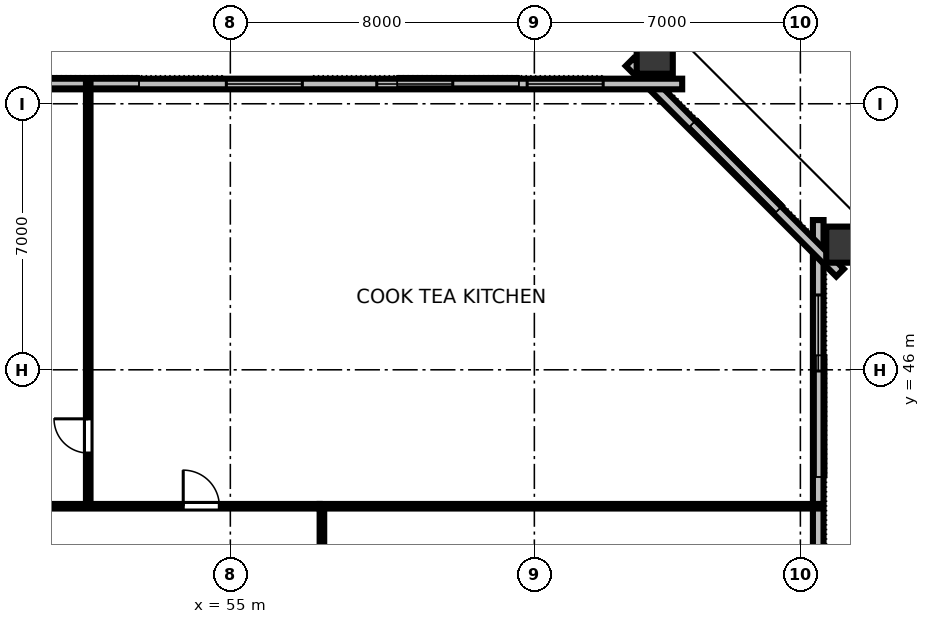
"""IFC4 building model, lengths in metres.
Left out: names, types, materials, properties, quantities, classifications, styles, units other than length and angle.
Written with IfcOpenShell. Run it as: python <this file> out.ifc"""

import sys

from ifc_helpers import new_model, si_unit, direction, frame, frame_2d, origin, origin_2d, place, context, subcontext, project, spatial, rectangle, hollow_rectangle, extrude, element, fill, save


model = new_model("IFC4")
c1 = context("Model", 3, precision=1e-05, world=origin(), true_north=direction((0.0, 1.0)))
c2 = subcontext(c1, "Body", "Model", "MODEL_VIEW")
j1 = project(units=[si_unit("LENGTHUNIT", "METRE"), si_unit("PLANEANGLEUNIT", "RADIAN")], contexts=[c1])
p1 = place(None, origin())
s1 = spatial("IfcSite", under=j1, at=p1, CompositionType="ELEMENT")
p2 = place(p1, origin())
s2 = spatial("IfcBuilding", under=s1, at=p2, CompositionType="ELEMENT")
p3 = place(p2, frame((0.0, 0.0, 67.6)))
s3 = spatial("IfcBuildingStorey", under=s2, at=p3, CompositionType="ELEMENT", Elevation=67.6)
p4 = place(p3, frame((71.256, 49.293, 0.0), z_axis=(0.103221863164, 0.030287087301, 0.994197133021), x_axis=(-0.953979075254, -0.279914028383, 0.107573512968)))
e1 = element("IfcColumn", 1, at=p4, inside=s3, PredefinedType="COLUMN", context=c2, shape_type="SweptSolid", body=[
    extrude(hollow_rectangle(XDim=0.95, YDim=1.15, WallThickness=0.06, at=origin_2d()), origin(), (0.0, 0.0, 1.0), 3.377),
])
p5 = place(p3, frame((66.168, 54.365, 0.0), z_axis=(0.044927645815, 0.088480693771, 0.995064155455), x_axis=(-0.891639602851, 0.452745865389, 0.0)))
e2 = element("IfcColumn", 2, at=p5, inside=s3, PredefinedType="COLUMN", context=c2, shape_type="SweptSolid", body=[
    extrude(hollow_rectangle(XDim=0.95, YDim=1.15, WallThickness=0.06, at=origin_2d()), origin(), (0.0, 0.0, 1.0), 3.375),
])
p6 = place(p3, frame((70.47, 14.06, 0.0), z_axis=(0.0, 0.0, 1.0), x_axis=(0.0, 1.0, 0.0)))
e3 = element("IfcWall", 3, at=p6, inside=s3, PredefinedType="STANDARD", context=c2, shape_type="SweptSolid", body=[
    extrude(rectangle(XDim=35.88, YDim=0.28, at=frame_2d((17.94, 0.0))), origin(), (0.0, 0.0, 1.0), 3.36),
])
p7 = place(p6, frame((19.29, 0.0, 0.0)))
e4 = element("IfcOpeningElement", 4, at=p7, cuts=e3, PredefinedType="OPENING", context=c2, shape_type="SweptSolid", body=[
    extrude(rectangle(XDim=1.4, YDim=2.15, at=frame_2d((0.7, 1.075))), frame((0.0, 0.15, 0.0), z_axis=(0.0, -1.0, 0.0), x_axis=(1.0, 0.0, 0.0)), (0.0, 0.0, 1.0), 0.3),
])
p8 = place(p6, frame((1.971, 0.0, 0.8)))
e5 = element("IfcOpeningElement", 5, at=p8, cuts=e3, PredefinedType="OPENING", context=c2, shape_type="SweptSolid", body=[
    extrude(rectangle(XDim=2.0, YDim=1.95, at=frame_2d((1.0, 0.975))), frame((0.0, 0.15, 0.0), z_axis=(0.0, -1.0, 0.0), x_axis=(1.0, 0.0, 0.0)), (0.0, 0.0, 1.0), 0.3),
])
p9 = place(p6, frame((9.456, 0.0, 0.8)))
e6 = element("IfcOpeningElement", 6, at=p9, cuts=e3, PredefinedType="OPENING", context=c2, shape_type="SweptSolid", body=[
    extrude(rectangle(XDim=2.0, YDim=1.95, at=frame_2d((1.0, 0.975))), frame((0.0, 0.15, 0.0), z_axis=(0.0, -1.0, 0.0), x_axis=(1.0, 0.0, 0.0)), (0.0, 0.0, 1.0), 0.3),
])
p10 = place(p6, frame((24.424, 0.0, 0.8)))
e7 = element("IfcOpeningElement", 7, at=p10, cuts=e3, PredefinedType="OPENING", context=c2, shape_type="SweptSolid", body=[
    extrude(rectangle(XDim=2.0, YDim=1.95, at=frame_2d((1.0, 0.975))), frame((0.0, 0.15, 0.0), z_axis=(0.0, -1.0, 0.0), x_axis=(1.0, 0.0, 0.0)), (0.0, 0.0, 1.0), 0.3),
])
p11 = place(p6, frame((31.909, 0.0, 0.8)))
e8 = element("IfcOpeningElement", 8, at=p11, cuts=e3, PredefinedType="OPENING", context=c2, shape_type="SweptSolid", body=[
    extrude(rectangle(XDim=2.0, YDim=1.95, at=frame_2d((1.0, 0.975))), frame((0.0, 0.15, 0.0), z_axis=(0.0, -1.0, 0.0), x_axis=(1.0, 0.0, 0.0)), (0.0, 0.0, 1.0), 0.3),
])
p12 = place(p3, frame((71.044, 48.554, 0.0), z_axis=(0.0, 0.0, 1.0), x_axis=(-0.707106781187, 0.707106781187, 0.0)))
e9 = element("IfcWall", 9, at=p12, inside=s3, PredefinedType="STANDARD", context=c2, shape_type="SweptSolid", body=[
    extrude(rectangle(XDim=7.834, YDim=0.28, at=frame_2d((3.917, 0.0))), origin(), (0.0, 0.0, 1.0), 3.36),
])
p13 = place(p3, frame((66.89, 53.52, 0.0), z_axis=(0.0, 0.0, 1.0), x_axis=(-1.0, 0.0, 0.0)))
e10 = element("IfcWall", 10, at=p13, inside=s3, PredefinedType="STANDARD", context=c2, shape_type="SweptSolid", body=[
    extrude(rectangle(XDim=41.78, YDim=0.28, at=frame_2d((20.89, 0.0))), origin(), (0.0, 0.0, 1.0), 3.36),
])
p14 = place(p13, frame((2.079, 0.0, 0.8)))
e11 = element("IfcOpeningElement", 11, at=p14, cuts=e10, PredefinedType="OPENING", context=c2, shape_type="SweptSolid", body=[
    extrude(rectangle(XDim=2.0, YDim=1.95, at=frame_2d((1.0, 0.975))), frame((0.0, 0.15, 0.0), z_axis=(0.0, -1.0, 0.0), x_axis=(1.0, 0.0, 0.0)), (0.0, 0.0, 1.0), 0.3),
])
p15 = place(p13, frame((6.037, 0.0, 0.8)))
e12 = element("IfcOpeningElement", 12, at=p15, cuts=e10, PredefinedType="OPENING", context=c2, shape_type="SweptSolid", body=[
    extrude(rectangle(XDim=2.0, YDim=1.95, at=frame_2d((1.0, 0.975))), frame((0.0, 0.15, 0.0), z_axis=(0.0, -1.0, 0.0), x_axis=(1.0, 0.0, 0.0)), (0.0, 0.0, 1.0), 0.3),
])
p16 = place(p13, frame((9.995, 0.0, 0.8)))
e13 = element("IfcOpeningElement", 13, at=p16, cuts=e10, PredefinedType="OPENING", context=c2, shape_type="SweptSolid", body=[
    extrude(rectangle(XDim=2.0, YDim=1.95, at=frame_2d((1.0, 0.975))), frame((0.0, 0.15, 0.0), z_axis=(0.0, -1.0, 0.0), x_axis=(1.0, 0.0, 0.0)), (0.0, 0.0, 1.0), 0.3),
])
p17 = place(p13, frame((21.869, 0.0, 0.8)))
e14 = element("IfcOpeningElement", 14, at=p17, cuts=e10, PredefinedType="OPENING", context=c2, shape_type="SweptSolid", body=[
    extrude(rectangle(XDim=2.0, YDim=1.95, at=frame_2d((1.0, 0.975))), frame((0.0, 0.15, 0.0), z_axis=(0.0, -1.0, 0.0), x_axis=(1.0, 0.0, 0.0)), (0.0, 0.0, 1.0), 0.3),
])
p18 = place(p13, frame((29.785, 0.0, 0.8)))
e15 = element("IfcOpeningElement", 15, at=p18, cuts=e10, PredefinedType="OPENING", context=c2, shape_type="SweptSolid", body=[
    extrude(rectangle(XDim=2.0, YDim=1.95, at=frame_2d((1.0, 0.975))), frame((0.0, 0.15, 0.0), z_axis=(0.0, -1.0, 0.0), x_axis=(1.0, 0.0, 0.0)), (0.0, 0.0, 1.0), 0.3),
])
p19 = place(p13, frame((33.743, 0.0, 0.8)))
e16 = element("IfcOpeningElement", 16, at=p19, cuts=e10, PredefinedType="OPENING", context=c2, shape_type="SweptSolid", body=[
    extrude(rectangle(XDim=2.0, YDim=1.95, at=frame_2d((1.0, 0.975))), frame((0.0, 0.15, 0.0), z_axis=(0.0, -1.0, 0.0), x_axis=(1.0, 0.0, 0.0)), (0.0, 0.0, 1.0), 0.3),
])
p20 = place(p13, frame((37.701, 0.0, 0.8)))
e17 = element("IfcOpeningElement", 17, at=p20, cuts=e10, PredefinedType="OPENING", context=c2, shape_type="SweptSolid", body=[
    extrude(rectangle(XDim=2.0, YDim=1.95, at=frame_2d((1.0, 0.975))), frame((0.0, 0.15, 0.0), z_axis=(0.0, -1.0, 0.0), x_axis=(1.0, 0.0, 0.0)), (0.0, 0.0, 1.0), 0.3),
])
p21 = place(p3, frame((51.261, 42.41, 0.0), z_axis=(0.0, 0.0, 1.0), x_axis=(0.0, 1.0, 0.0)))
e18 = element("IfcWall", 18, at=p21, inside=s3, PredefinedType="PARTITIONING", context=c2, shape_type="SweptSolid", body=[
    extrude(rectangle(XDim=11.11, YDim=0.12, at=frame_2d((5.555, 0.0))), origin(), (0.0, 0.0, 1.0), 2.64),
])
p22 = place(p21, frame((1.4, 0.0, 0.0)))
e19 = element("IfcOpeningElement", 19, at=p22, cuts=e18, PredefinedType="OPENING", context=c2, shape_type="SweptSolid", body=[
    extrude(rectangle(XDim=0.9, YDim=2.15, at=frame_2d((0.45, 1.075))), frame((0.0, 0.07, 0.0), z_axis=(0.0, -1.0, 0.0), x_axis=(1.0, 0.0, 0.0)), (0.0, 0.0, 1.0), 0.14),
])
p23 = place(p3, frame((34.65, 42.41, 0.0), z_axis=(0.0, 0.0, 1.0), x_axis=(1.0, 0.0, 0.0)))
e20 = element("IfcWall", 20, at=p23, inside=s3, PredefinedType="PARTITIONING", context=c2, shape_type="SweptSolid", body=[
    extrude(rectangle(XDim=22.7, YDim=0.12, at=frame_2d((11.35, 0.0))), origin(), (0.0, 0.0, 1.0), 2.64),
])
p24 = place(p23, frame((2.59, 0.0, 0.0)))
e21 = element("IfcOpeningElement", 21, at=p24, cuts=e20, PredefinedType="OPENING", context=c2, shape_type="SweptSolid", body=[
    extrude(rectangle(XDim=0.95, YDim=2.15, at=frame_2d((0.475, 1.075))), frame((0.0, 0.07, 0.0), z_axis=(0.0, -1.0, 0.0), x_axis=(1.0, 0.0, 0.0)), (0.0, 0.0, 1.0), 0.14),
])
p25 = place(p23, frame((8.768, 0.0, 0.0)))
e22 = element("IfcOpeningElement", 22, at=p25, cuts=e20, PredefinedType="OPENING", context=c2, shape_type="SweptSolid", body=[
    extrude(rectangle(XDim=0.95, YDim=2.15, at=frame_2d((0.475, 1.075))), frame((0.0, 0.07, 0.0), z_axis=(0.0, -1.0, 0.0), x_axis=(1.0, 0.0, 0.0)), (0.0, 0.0, 1.0), 0.14),
])
p26 = place(p23, frame((14.079, 0.0, 0.0)))
e23 = element("IfcOpeningElement", 23, at=p26, cuts=e20, PredefinedType="OPENING", context=c2, shape_type="SweptSolid", body=[
    extrude(rectangle(XDim=0.95, YDim=2.15, at=frame_2d((0.475, 1.075))), frame((0.0, 0.07, 0.0), z_axis=(0.0, -1.0, 0.0), x_axis=(1.0, 0.0, 0.0)), (0.0, 0.0, 1.0), 0.14),
])
p27 = place(p23, frame((19.11, 0.0, 0.0)))
e24 = element("IfcOpeningElement", 24, at=p27, cuts=e20, PredefinedType="OPENING", context=c2, shape_type="SweptSolid", body=[
    extrude(rectangle(XDim=0.95, YDim=2.15, at=frame_2d((0.475, 1.075))), frame((0.0, 0.07, 0.0), z_axis=(0.0, -1.0, 0.0), x_axis=(1.0, 0.0, 0.0)), (0.0, 0.0, 1.0), 0.14),
])
p28 = place(p3, frame((57.41, 21.65, 0.0), z_axis=(0.0, 0.0, 1.0), x_axis=(0.0, 1.0, 0.0)))
e25 = element("IfcWall", 25, at=p28, inside=s3, PredefinedType="PARTITIONING", context=c2, shape_type="SweptSolid", body=[
    extrude(rectangle(XDim=20.7, YDim=0.12, at=frame_2d((10.35, 0.0))), origin(), (0.0, 0.0, 1.0), 2.64),
])
p29 = place(p28, frame((3.502, 0.0, 0.0)))
e26 = element("IfcOpeningElement", 26, at=p29, cuts=e25, PredefinedType="OPENING", context=c2, shape_type="SweptSolid", body=[
    extrude(rectangle(XDim=0.95, YDim=2.15, at=frame_2d((0.475, 1.075))), frame((0.0, 0.07, 0.0), z_axis=(0.0, -1.0, 0.0), x_axis=(1.0, 0.0, 0.0)), (0.0, 0.0, 1.0), 0.14),
])
p30 = place(p28, frame((13.652, 0.0, 0.0)))
e27 = element("IfcOpeningElement", 27, at=p30, cuts=e25, PredefinedType="OPENING", context=c2, shape_type="SweptSolid", body=[
    extrude(rectangle(XDim=0.95, YDim=2.15, at=frame_2d((0.475, 1.075))), frame((0.0, 0.07, 0.0), z_axis=(0.0, -1.0, 0.0), x_axis=(1.0, 0.0, 0.0)), (0.0, 0.0, 1.0), 0.14),
])
p31 = place(p3, frame((57.35, 42.41, 0.0), z_axis=(0.0, 0.0, 1.0), x_axis=(1.0, 0.0, 0.0)))
e28 = element("IfcWall", 28, at=p31, inside=s3, PredefinedType="PARTITIONING", context=c2, shape_type="SweptSolid", body=[
    extrude(rectangle(XDim=13.12, YDim=0.12, at=frame_2d((6.56, 0.0))), origin(), (0.0, 0.0, 1.0), 2.64),
])
p32 = place(p11, origin())
e29 = element("IfcWindow", 29, at=p32, inside=s3, PartitioningType="SINGLE_PANEL", PredefinedType="WINDOW", context=c2, shape_type="SweptSolid", body=[
    extrude(rectangle(XDim=2.0, YDim=1.95, at=frame_2d((1.0, 0.975))), frame((0.0, 0.03, 0.0), z_axis=(0.0, -1.0, 0.0), x_axis=(1.0, 0.0, 0.0)), (0.0, 0.0, 1.0), 0.06),
])
fill(e8, e29)
p33 = place(p14, origin())
e30 = element("IfcWindow", 30, at=p33, inside=s3, PartitioningType="SINGLE_PANEL", PredefinedType="WINDOW", context=c2, shape_type="SweptSolid", body=[
    extrude(rectangle(XDim=2.0, YDim=1.95, at=frame_2d((1.0, 0.975))), frame((0.0, 0.03, 0.0), z_axis=(0.0, -1.0, 0.0), x_axis=(1.0, 0.0, 0.0)), (0.0, 0.0, 1.0), 0.06),
])
fill(e11, e30)
p34 = place(p15, origin())
e31 = element("IfcWindow", 31, at=p34, inside=s3, PartitioningType="SINGLE_PANEL", PredefinedType="WINDOW", context=c2, shape_type="SweptSolid", body=[
    extrude(rectangle(XDim=2.0, YDim=1.95, at=frame_2d((1.0, 0.975))), frame((0.0, 0.03, 0.0), z_axis=(0.0, -1.0, 0.0), x_axis=(1.0, 0.0, 0.0)), (0.0, 0.0, 1.0), 0.06),
])
fill(e12, e31)
p35 = place(p16, origin())
e32 = element("IfcWindow", 32, at=p35, inside=s3, PartitioningType="SINGLE_PANEL", PredefinedType="WINDOW", context=c2, shape_type="SweptSolid", body=[
    extrude(rectangle(XDim=2.0, YDim=1.95, at=frame_2d((1.0, 0.975))), frame((0.0, 0.03, 0.0), z_axis=(0.0, -1.0, 0.0), x_axis=(1.0, 0.0, 0.0)), (0.0, 0.0, 1.0), 0.06),
])
fill(e13, e32)
p36 = place(p22, origin())
e33 = element("IfcDoor", 33, at=p36, inside=s3, OperationType="SINGLE_SWING_RIGHT", PredefinedType="DOOR", context=c2, shape_type="SweptSolid", body=[
    extrude(rectangle(XDim=0.9, YDim=2.15, at=frame_2d((0.45, 1.075))), frame((0.0, 0.025, 0.0), z_axis=(0.0, -1.0, 0.0), x_axis=(1.0, 0.0, 0.0)), (0.0, 0.0, 1.0), 0.05),
])
fill(e19, e33)
p37 = place(p27, origin())
e34 = element("IfcDoor", 34, at=p37, inside=s3, OperationType="SINGLE_SWING_LEFT", PredefinedType="DOOR", context=c2, shape_type="SweptSolid", body=[
    extrude(rectangle(XDim=0.95, YDim=2.15, at=frame_2d((0.475, 1.075))), frame((0.0, 0.025, 0.0), z_axis=(0.0, -1.0, 0.0), x_axis=(1.0, 0.0, 0.0)), (0.0, 0.0, 1.0), 0.05),
])
fill(e24, e34)
save(model, sys.argv[1])
